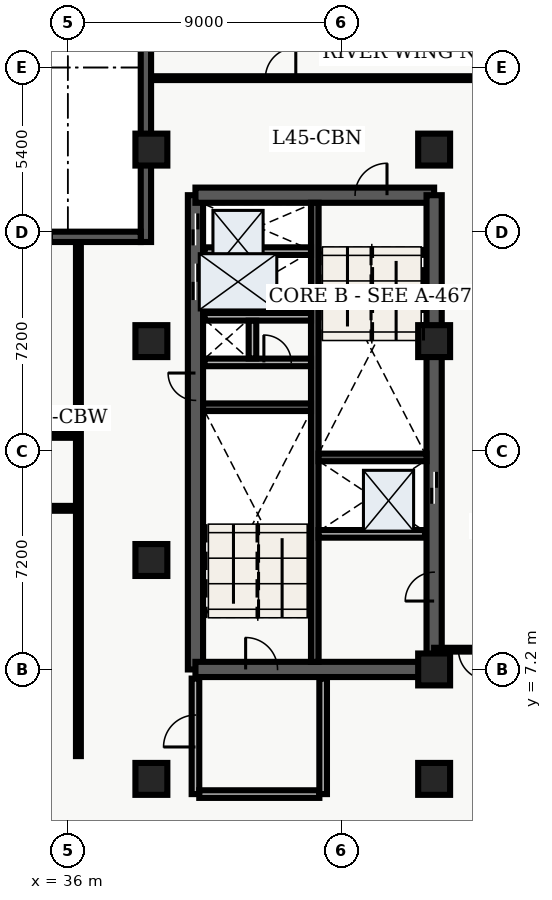
"""IFC4 building model, lengths in metres.
Left out: names, types, materials, properties, quantities, classifications, styles, units other than length and angle.
Written with IfcOpenShell. Run it as: python <this file> out.ifc"""

import sys

from ifc_helpers import new_model, entity, si_unit, converted_unit, direction, frame, origin_with_axes, origin_2d_with_axis, place, context, subcontext, project, spatial, polyline, rectangle, outline, extrude, element, fill, save


model = new_model("IFC4")
c1 = context("Model", 3, precision=1e-05, world=origin_with_axes(), true_north=direction((0.0, 1.0)))
c2 = subcontext(c1, "Body", "Model", "MODEL_VIEW")
j1 = project(units=[si_unit("LENGTHUNIT", "METRE"), converted_unit("PLANEANGLEUNIT", "DEGREE", entity("IfcPlaneAngleMeasure", 0.017), si_unit("PLANEANGLEUNIT", "RADIAN"), dimensions=[0, 0, 0, 0, 0, 0, 0])], contexts=[c1])
p1 = place(None, origin_with_axes())
s1 = spatial("IfcSite", under=j1, at=p1, CompositionType="ELEMENT")
p2 = place(p1, origin_with_axes())
s2 = spatial("IfcBuilding", under=s1, at=p2, CompositionType="ELEMENT")
p3 = place(p2, frame((0.0, 0.0, 183.6), z_axis=(0.0, 0.0, 1.0), x_axis=(1.0, 0.0, 0.0)))
s3 = spatial("IfcBuildingStorey", under=s2, at=p3, CompositionType="ELEMENT", Elevation=183.6)
p4 = place(p3, frame((40.2, 7.2, 0.0), z_axis=(0.0, 0.0, 1.0), x_axis=(0.0, 1.0, 0.0)))
e1 = element("IfcWall", 1, at=p4, inside=s3, PredefinedType="SHEAR", context=c2, shape_type="SweptSolid", body=[
    extrude(outline(polyline([(0.0, -0.25), (15.6, -0.25), (15.6, 0.25), (0.0, 0.25), (0.0, -0.25)])), origin_with_axes(), (0.0, 0.0, 1.0), 3.6),
])
p5 = place(p4, frame((14.475, 0.0, 0.0), z_axis=(0.0, 0.0, 1.0), x_axis=(1.0, 0.0, 0.0)))
e2 = element("IfcOpeningElement", 2, at=p5, cuts=e1, PredefinedType="OPENING", context=c2, shape_type="SweptSolid", body=[
    extrude(rectangle(XDim=1.05, YDim=0.52, at=origin_2d_with_axis()), origin_with_axes(), (0.0, 0.0, 1.0), 2.15),
])
p6 = place(p4, frame((12.75, 0.0, 0.0), z_axis=(0.0, 0.0, 1.0), x_axis=(1.0, 0.0, 0.0)))
e3 = element("IfcOpeningElement", 3, at=p6, cuts=e1, PredefinedType="OPENING", context=c2, shape_type="SweptSolid", body=[
    extrude(rectangle(XDim=1.2, YDim=0.52, at=origin_2d_with_axis()), origin_with_axes(), (0.0, 0.0, 1.0), 2.15),
])
p7 = place(p4, frame((9.3, 0.0, 0.0), z_axis=(0.0, 0.0, 1.0), x_axis=(1.0, 0.0, 0.0)))
e4 = element("IfcOpeningElement", 4, at=p7, cuts=e1, PredefinedType="OPENING", context=c2, shape_type="SweptSolid", body=[
    extrude(rectangle(XDim=0.9, YDim=0.52, at=origin_2d_with_axis()), origin_with_axes(), (0.0, 0.0, 1.0), 2.15),
])
p8 = place(p3, frame((40.2, 7.2, 0.0), z_axis=(0.0, 0.0, 1.0), x_axis=(1.0, 0.0, 0.0)))
e5 = element("IfcWall", 5, at=p8, inside=s3, PredefinedType="SHEAR", context=c2, shape_type="SweptSolid", body=[
    extrude(outline(polyline([(0.0, -0.25), (7.85, -0.25), (7.85, 0.25), (0.0, 0.25), (0.0, -0.25)])), origin_with_axes(), (0.0, 0.0, 1.0), 3.6),
])
p9 = place(p8, frame((2.175, 0.0, 0.0), z_axis=(0.0, 0.0, 1.0), x_axis=(1.0, 0.0, 0.0)))
e6 = element("IfcOpeningElement", 6, at=p9, cuts=e5, PredefinedType="OPENING", context=c2, shape_type="SweptSolid", body=[
    extrude(rectangle(XDim=1.05, YDim=0.52, at=origin_2d_with_axis()), origin_with_axes(), (0.0, 0.0, 1.0), 2.15),
])
p10 = place(p3, frame((40.2, 22.8, 0.0), z_axis=(0.0, 0.0, 1.0), x_axis=(1.0, 0.0, 0.0)))
e7 = element("IfcWall", 7, at=p10, inside=s3, PredefinedType="SHEAR", context=c2, shape_type="SweptSolid", body=[
    extrude(outline(polyline([(0.0, -0.25), (7.85, -0.25), (7.85, 0.25), (0.0, 0.25), (0.0, -0.25)])), origin_with_axes(), (0.0, 0.0, 1.0), 3.6),
])
p11 = place(p10, frame((5.775, 0.0, 0.0), z_axis=(0.0, 0.0, 1.0), x_axis=(1.0, 0.0, 0.0)))
e8 = element("IfcOpeningElement", 8, at=p11, cuts=e7, PredefinedType="OPENING", context=c2, shape_type="SweptSolid", body=[
    extrude(rectangle(XDim=1.05, YDim=0.52, at=origin_2d_with_axis()), origin_with_axes(), (0.0, 0.0, 1.0), 2.15),
])
p12 = place(p3, frame((48.05, 7.2, 0.0), z_axis=(0.0, 0.0, 1.0), x_axis=(0.0, 1.0, 0.0)))
e9 = element("IfcWall", 9, at=p12, inside=s3, PredefinedType="SHEAR", context=c2, shape_type="SweptSolid", body=[
    extrude(outline(polyline([(0.0, -0.25), (15.6, -0.25), (15.6, 0.25), (0.0, 0.25), (0.0, -0.25)])), origin_with_axes(), (0.0, 0.0, 1.0), 3.6),
])
p13 = place(p12, frame((5.975, 0.0, 0.0), z_axis=(0.0, 0.0, 1.0), x_axis=(1.0, 0.0, 0.0)))
e10 = element("IfcOpeningElement", 10, at=p13, cuts=e9, PredefinedType="OPENING", context=c2, shape_type="SweptSolid", body=[
    extrude(rectangle(XDim=1.05, YDim=0.52, at=origin_2d_with_axis()), origin_with_axes(), (0.0, 0.0, 1.0), 2.15),
])
p14 = place(p12, frame((2.725, 0.0, 0.0), z_axis=(0.0, 0.0, 1.0), x_axis=(1.0, 0.0, 0.0)))
e11 = element("IfcOpeningElement", 11, at=p14, cuts=e9, PredefinedType="OPENING", context=c2, shape_type="SweptSolid", body=[
    extrude(rectangle(XDim=0.95, YDim=0.52, at=origin_2d_with_axis()), origin_with_axes(), (0.0, 0.0, 1.0), 2.15),
])
p15 = place(p3, frame((44.125, 7.45, 0.0), z_axis=(0.0, 0.0, 1.0), x_axis=(0.0, 1.0, 0.0)))
e12 = element("IfcWall", 12, at=p15, inside=s3, PredefinedType="SHEAR", context=c2, shape_type="SweptSolid", body=[
    extrude(outline(polyline([(0.0, -0.125), (15.1, -0.125), (15.1, 0.125), (0.0, 0.125), (0.0, -0.125)])), origin_with_axes(), (0.0, 0.0, 1.0), 3.6),
])
for number, where, z_axis, x_axis in (
    (13, (40.45, 15.825, 0.0), (0.0, 0.0, 1.0), (1.0, 0.0, 0.0)),
    (14, (44.25, 14.175, 0.0), (0.0, 0.0, 1.0), (1.0, 0.0, 0.0)),
):
    element("IfcWall", number, at=place(p3, frame(where, z_axis=z_axis, x_axis=x_axis)), inside=s3, PredefinedType="SHEAR", context=c2, shape_type="SweptSolid", body=[
        extrude(outline(polyline([(0.0, -0.125), (3.55, -0.125), (3.55, 0.125), (0.0, 0.125), (0.0, -0.125)])), origin_with_axes(), (0.0, 0.0, 1.0), 3.6),
    ])
p16 = place(p3, frame((40.5, 17.3, 0.0), z_axis=(0.0, 0.0, 1.0), x_axis=(1.0, 0.0, 0.0)))
e15 = element("IfcWall", 15, at=p16, inside=s3, PredefinedType="SOLIDWALL", context=c2, shape_type="SweptSolid", body=[
    extrude(outline(polyline([(0.0, -0.125), (3.5, -0.125), (3.5, 0.125), (0.0, 0.125), (0.0, -0.125)])), origin_with_axes(), (0.0, 0.0, 1.0), 2.64),
])
p17 = place(p16, frame((2.4, 0.0, 0.0), z_axis=(0.0, 0.0, 1.0), x_axis=(1.0, 0.0, 0.0)))
e16 = element("IfcOpeningElement", 16, at=p17, cuts=e15, PredefinedType="OPENING", context=c2, shape_type="SweptSolid", body=[
    extrude(rectangle(XDim=0.9, YDim=0.27, at=origin_2d_with_axis()), origin_with_axes(), (0.0, 0.0, 1.0), 2.15),
])
p18 = place(p3, frame((40.5, 18.8, 0.0), z_axis=(0.0, 0.0, 1.0), x_axis=(1.0, 0.0, 0.0)))
e17 = element("IfcWall", 17, at=p18, inside=s3, PredefinedType="SOLIDWALL", context=c2, shape_type="SweptSolid", body=[
    extrude(outline(polyline([(0.0, -0.125), (3.5, -0.125), (3.5, 0.125), (0.0, 0.125), (0.0, -0.125)])), origin_with_axes(), (0.0, 0.0, 1.0), 2.64),
])
p19 = place(p3, frame((42.075, 17.43, 0.0), z_axis=(0.0, 0.0, 1.0), x_axis=(0.0, 1.0, 0.0)))
e18 = element("IfcWall", 18, at=p19, inside=s3, PredefinedType="SOLIDWALL", context=c2, shape_type="SweptSolid", body=[
    extrude(outline(polyline([(0.0, -0.125), (1.24, -0.125), (1.24, 0.125), (0.0, 0.125), (0.0, -0.125)])), origin_with_axes(), (0.0, 0.0, 1.0), 2.64),
])
p20 = place(p3, frame((40.2, 3.1, 0.0), z_axis=(0.0, 0.0, 1.0), x_axis=(0.0, 1.0, 0.0)))
e19 = element("IfcWall", 19, at=p20, inside=s3, PredefinedType="SOLIDWALL", context=c2, shape_type="SweptSolid", body=[
    extrude(outline(polyline([(0.0, -0.125), (3.8, -0.125), (3.8, 0.125), (0.0, 0.125), (0.0, -0.125)])), origin_with_axes(), (0.0, 0.0, 1.0), 2.64),
])
p21 = place(p20, frame((2.075, 0.0, 0.0), z_axis=(0.0, 0.0, 1.0), x_axis=(1.0, 0.0, 0.0)))
e20 = element("IfcOpeningElement", 20, at=p21, cuts=e19, PredefinedType="OPENING", context=c2, shape_type="SweptSolid", body=[
    extrude(rectangle(XDim=1.05, YDim=0.27, at=origin_2d_with_axis()), origin_with_axes(), (0.0, 0.0, 1.0), 2.15),
])
p22 = place(p3, frame((40.325, 3.1, 0.0), z_axis=(0.0, 0.0, 1.0), x_axis=(1.0, 0.0, 0.0)))
e21 = element("IfcWall", 21, at=p22, inside=s3, PredefinedType="SOLIDWALL", context=c2, shape_type="SweptSolid", body=[
    extrude(outline(polyline([(0.0, -0.125), (3.95, -0.125), (3.95, 0.125), (0.0, 0.125), (0.0, -0.125)])), origin_with_axes(), (0.0, 0.0, 1.0), 2.64),
])
p23 = place(p3, frame((44.4, 3.1, 0.0), z_axis=(0.0, 0.0, 1.0), x_axis=(0.0, 1.0, 0.0)))
e22 = element("IfcWall", 22, at=p23, inside=s3, PredefinedType="SOLIDWALL", context=c2, shape_type="SweptSolid", body=[
    extrude(outline(polyline([(0.0, -0.125), (3.8, -0.125), (3.8, 0.125), (0.0, 0.125), (0.0, -0.125)])), origin_with_axes(), (0.0, 0.0, 1.0), 2.64),
])
for number, where, z_axis, x_axis in (
    (23, (38.75, 3.6, 0.0), (0.0, 0.0, 1.0), (1.0, 0.0, 0.0)),
    (24, (38.75, 10.8, 0.0), (0.0, 0.0, 1.0), (1.0, 0.0, 0.0)),
    (25, (38.75, 18.0, 0.0), (0.0, 0.0, 1.0), (1.0, 0.0, 0.0)),
    (26, (38.75, 24.3, 0.0), (0.0, 0.0, 1.0), (1.0, 0.0, 0.0)),
    (27, (48.05, 3.6, 0.0), (0.0, 0.0, 1.0), (1.0, 0.0, 0.0)),
    (28, (48.05, 7.2, 0.0), (0.0, 0.0, 1.0), (1.0, 0.0, 0.0)),
    (29, (48.05, 18.0, 0.0), (0.0, 0.0, 1.0), (1.0, 0.0, 0.0)),
    (30, (48.05, 24.3, 0.0), (0.0, 0.0, 1.0), (1.0, 0.0, 0.0)),
):
    element("IfcColumn", number, at=place(p3, frame(where, z_axis=z_axis, x_axis=x_axis)), inside=s3, PredefinedType="COLUMN", context=c2, shape_type="SweptSolid", body=[
        extrude(rectangle(XDim=1.05, YDim=1.05, at=origin_2d_with_axis()), origin_with_axes(), (0.0, 0.0, 1.0), 3.9),
    ])
for number, where, z_axis, x_axis in (
    (31, (40.5, 20.96, 0.0), (0.0, 0.0, 1.0), (1.0, 0.0, 0.0)),
    (32, (44.25, 11.66, 0.0), (0.0, 0.0, 1.0), (1.0, 0.0, 0.0)),
):
    element("IfcWall", number, at=place(p3, frame(where, z_axis=z_axis, x_axis=x_axis)), inside=s3, PredefinedType="SOLIDWALL", context=c2, shape_type="SweptSolid", body=[
        extrude(outline(polyline([(0.0, -0.125), (3.5, -0.125), (3.5, 0.125), (0.0, 0.125), (0.0, -0.125)])), origin_with_axes(), (0.0, 0.0, 1.0), 2.64),
    ])
p24 = place(p3, frame((21.15, 12.5, 0.0), z_axis=(0.0, 0.0, 1.0), x_axis=(1.0, 0.0, 0.0)))
e33 = element("IfcWall", 33, at=p24, inside=s3, PredefinedType="PARTITIONING", context=c2, shape_type="SweptSolid", body=[
    extrude(outline(polyline([(0.0, -0.08), (15.2, -0.08), (15.2, 0.08), (0.0, 0.08), (0.0, -0.08)])), origin_with_axes(), (0.0, 0.0, 1.0), 2.64),
])
p25 = place(p24, frame((1.951, 0.0, 0.0), z_axis=(0.0, 0.0, 1.0), x_axis=(1.0, 0.0, 0.0)))
e34 = element("IfcOpeningElement", 34, at=p25, cuts=e33, PredefinedType="OPENING", context=c2, shape_type="SweptSolid", body=[
    extrude(rectangle(XDim=1.0, YDim=0.18, at=origin_2d_with_axis()), origin_with_axes(), (0.0, 0.0, 1.0), 2.15),
])
p26 = place(p24, frame((5.086, 0.0, 0.0), z_axis=(0.0, 0.0, 1.0), x_axis=(1.0, 0.0, 0.0)))
e35 = element("IfcOpeningElement", 35, at=p26, cuts=e33, PredefinedType="OPENING", context=c2, shape_type="SweptSolid", body=[
    extrude(rectangle(XDim=1.0, YDim=0.18, at=origin_2d_with_axis()), origin_with_axes(), (0.0, 0.0, 1.0), 2.15),
])
p27 = place(p24, frame((9.28, 0.0, 0.0), z_axis=(0.0, 0.0, 1.0), x_axis=(1.0, 0.0, 0.0)))
e36 = element("IfcOpeningElement", 36, at=p27, cuts=e33, PredefinedType="OPENING", context=c2, shape_type="SweptSolid", body=[
    extrude(rectangle(XDim=1.2, YDim=0.18, at=origin_2d_with_axis()), origin_with_axes(), (0.0, 0.0, 1.0), 2.2),
])
p28 = place(p24, frame((13.055, 0.0, 0.0), z_axis=(0.0, 0.0, 1.0), x_axis=(1.0, 0.0, 0.0)))
e37 = element("IfcOpeningElement", 37, at=p28, cuts=e33, PredefinedType="OPENING", context=c2, shape_type="SweptSolid", body=[
    extrude(rectangle(XDim=1.0, YDim=0.18, at=origin_2d_with_axis()), origin_with_axes(), (0.0, 0.0, 1.0), 2.15),
])
p29 = place(p3, frame((21.15, 14.9, 0.0), z_axis=(0.0, 0.0, 1.0), x_axis=(1.0, 0.0, 0.0)))
e38 = element("IfcWall", 38, at=p29, inside=s3, PredefinedType="PARTITIONING", context=c2, shape_type="SweptSolid", body=[
    extrude(outline(polyline([(0.0, -0.08), (15.2, -0.08), (15.2, 0.08), (0.0, 0.08), (0.0, -0.08)])), origin_with_axes(), (0.0, 0.0, 1.0), 2.64),
])
p30 = place(p29, frame((7.65, 0.0, 0.0), z_axis=(0.0, 0.0, 1.0), x_axis=(1.0, 0.0, 0.0)))
e39 = element("IfcOpeningElement", 39, at=p30, cuts=e38, PredefinedType="OPENING", context=c2, shape_type="SweptSolid", body=[
    extrude(rectangle(XDim=1.0, YDim=0.18, at=origin_2d_with_axis()), origin_with_axes(), (0.0, 0.0, 1.0), 2.15),
])
p31 = place(p3, frame((36.35, 4.35, 0.0), z_axis=(0.0, 0.0, 1.0), x_axis=(0.0, 1.0, 0.0)))
e40 = element("IfcWall", 40, at=p31, inside=s3, PredefinedType="PARTITIONING", context=c2, shape_type="SweptSolid", body=[
    extrude(outline(polyline([(0.0, -0.08), (16.95, -0.08), (16.95, 0.08), (0.0, 0.08), (0.0, -0.08)])), origin_with_axes(), (0.0, 0.0, 1.0), 2.64),
])
p32 = place(p3, frame((59.665, 7.85, 0.0), z_axis=(0.0, 0.0, 1.0), x_axis=(-1.0, 0.0, 0.0)))
e41 = element("IfcWall", 41, at=p32, inside=s3, PredefinedType="PARTITIONING", context=c2, shape_type="SweptSolid", body=[
    extrude(outline(polyline([(0.0, -0.062), (11.615, -0.062), (11.615, 0.062), (0.0, 0.062), (0.0, -0.062)])), origin_with_axes(), (0.0, 0.0, 1.0), 2.64),
])
p33 = place(p32, frame((10.315, 0.0, 0.0), z_axis=(0.0, 0.0, 1.0), x_axis=(1.0, 0.0, 0.0)))
e42 = element("IfcOpeningElement", 42, at=p33, cuts=e41, PredefinedType="OPENING", context=c2, shape_type="SweptSolid", body=[
    extrude(rectangle(XDim=1.0, YDim=0.145, at=origin_2d_with_axis()), origin_with_axes(), (0.0, 0.0, 1.0), 2.15),
])
p34 = place(p3, frame((38.735, 26.65, 0.0), z_axis=(0.0, 0.0, 1.0), x_axis=(1.0, 0.0, 0.0)))
e43 = element("IfcWall", 43, at=p34, inside=s3, PredefinedType="PARTITIONING", context=c2, shape_type="SweptSolid", body=[
    extrude(outline(polyline([(0.0, -0.062), (20.905, -0.062), (20.905, 0.062), (0.0, 0.062), (0.0, -0.062)])), origin_with_axes(), (0.0, 0.0, 1.0), 2.64),
])
p35 = place(p34, frame((4.265, 0.0, 0.0), z_axis=(0.0, 0.0, 1.0), x_axis=(1.0, 0.0, 0.0)))
e44 = element("IfcOpeningElement", 44, at=p35, cuts=e43, PredefinedType="OPENING", context=c2, shape_type="SweptSolid", body=[
    extrude(rectangle(XDim=1.0, YDim=0.145, at=origin_2d_with_axis()), origin_with_axes(), (0.0, 0.0, 1.0), 2.15),
])
p36 = place(p3, frame((38.57, 21.26, 0.0), z_axis=(0.0, 0.0, 1.0), x_axis=(0.0, 1.0, 0.0)))
e45 = element("IfcWall", 45, at=p36, inside=s3, PredefinedType="SOLIDWALL", context=c2, shape_type="SweptSolid", body=[
    extrude(outline(polyline([(0.0, -0.17), (7.54, -0.17), (7.54, 0.17), (0.0, 0.17), (0.0, -0.17)])), origin_with_axes(), (0.0, 0.0, 1.0), 3.6),
])
p37 = place(p3, frame((26.054, 21.43, 0.0), z_axis=(0.0, 0.0, 1.0), x_axis=(1.0, 0.0, 0.0)))
e46 = element("IfcWall", 46, at=p37, inside=s3, PredefinedType="SOLIDWALL", context=c2, shape_type="SweptSolid", body=[
    extrude(outline(polyline([(0.0, -0.17), (12.346, -0.17), (12.346, 0.17), (0.0, 0.17), (0.0, -0.17)])), origin_with_axes(), (0.0, 0.0, 1.0), 3.6),
])
p38 = place(p37, frame((3.387, 0.0, 0.45), z_axis=(0.0, 0.0, 1.0), x_axis=(1.0, 0.0, 0.0)))
e47 = element("IfcOpeningElement", 47, at=p38, cuts=e46, PredefinedType="OPENING", context=c2, shape_type="SweptSolid", body=[
    extrude(rectangle(XDim=1.8, YDim=0.36, at=origin_2d_with_axis()), origin_with_axes(), (0.0, 0.0, 1.0), 2.1),
])
p39 = place(p37, frame((8.509, 0.0, 0.45), z_axis=(0.0, 0.0, 1.0), x_axis=(1.0, 0.0, 0.0)))
e48 = element("IfcOpeningElement", 48, at=p39, cuts=e46, PredefinedType="OPENING", context=c2, shape_type="SweptSolid", body=[
    extrude(rectangle(XDim=1.8, YDim=0.36, at=origin_2d_with_axis()), origin_with_axes(), (0.0, 0.0, 1.0), 2.1),
])
p40 = place(p12, frame((5.975, 0.0, 0.0), z_axis=(0.0, 0.0, 1.0), x_axis=(1.0, 0.0, 0.0)))
e49 = element("IfcDoor", 49, at=p40, inside=s3, OperationType="SLIDING_TO_LEFT", PredefinedType="DOOR", context=c2, shape_type="SweptSolid", body=[
    extrude(rectangle(XDim=1.05, YDim=0.09, at=origin_2d_with_axis()), origin_with_axes(), (0.0, 0.0, 1.0), 2.15),
])
fill(e10, e49)
p41 = place(p4, frame((14.475, 0.0, 0.0), z_axis=(0.0, 0.0, 1.0), x_axis=(1.0, 0.0, 0.0)))
e50 = element("IfcDoor", 50, at=p41, inside=s3, OperationType="SLIDING_TO_RIGHT", PredefinedType="DOOR", context=c2, shape_type="SweptSolid", body=[
    extrude(rectangle(XDim=1.05, YDim=0.09, at=origin_2d_with_axis()), origin_with_axes(), (0.0, 0.0, 1.0), 2.15),
])
fill(e2, e50)
p42 = place(p4, frame((12.75, 0.0, 0.0), z_axis=(0.0, 0.0, 1.0), x_axis=(1.0, 0.0, 0.0)))
e51 = element("IfcDoor", 51, at=p42, inside=s3, OperationType="DOUBLE_DOOR_SLIDING", PredefinedType="DOOR", context=c2, shape_type="SweptSolid", body=[
    extrude(rectangle(XDim=1.2, YDim=0.09, at=origin_2d_with_axis()), origin_with_axes(), (0.0, 0.0, 1.0), 2.15),
])
fill(e3, e51)
p43 = place(p4, frame((9.3, 0.0, 0.0), z_axis=(0.0, 0.0, 1.0), x_axis=(1.0, 0.0, 0.0)))
e52 = element("IfcDoor", 52, at=p43, inside=s3, OperationType="SINGLE_SWING_RIGHT", PredefinedType="DOOR", context=c2, shape_type="SweptSolid", body=[
    extrude(rectangle(XDim=0.9, YDim=0.09, at=origin_2d_with_axis()), origin_with_axes(), (0.0, 0.0, 1.0), 2.15),
])
fill(e4, e52)
p44 = place(p16, frame((2.4, 0.0, 0.0), z_axis=(0.0, 0.0, 1.0), x_axis=(1.0, 0.0, 0.0)))
e53 = element("IfcDoor", 53, at=p44, inside=s3, OperationType="SINGLE_SWING_LEFT", PredefinedType="DOOR", context=c2, shape_type="SweptSolid", body=[
    extrude(rectangle(XDim=0.9, YDim=0.09, at=origin_2d_with_axis()), origin_with_axes(), (0.0, 0.0, 1.0), 2.15),
])
fill(e16, e53)
p45 = place(p8, frame((2.175, 0.0, 0.0), z_axis=(0.0, 0.0, 1.0), x_axis=(1.0, 0.0, 0.0)))
e54 = element("IfcDoor", 54, at=p45, inside=s3, OperationType="SINGLE_SWING_LEFT", PredefinedType="DOOR", context=c2, shape_type="SweptSolid", body=[
    extrude(rectangle(XDim=1.05, YDim=0.09, at=origin_2d_with_axis()), origin_with_axes(), (0.0, 0.0, 1.0), 2.15),
])
fill(e6, e54)
p46 = place(p10, frame((5.775, 0.0, 0.0), z_axis=(0.0, 0.0, 1.0), x_axis=(1.0, 0.0, 0.0)))
e55 = element("IfcDoor", 55, at=p46, inside=s3, OperationType="SINGLE_SWING_RIGHT", PredefinedType="DOOR", context=c2, shape_type="SweptSolid", body=[
    extrude(rectangle(XDim=1.05, YDim=0.09, at=origin_2d_with_axis()), origin_with_axes(), (0.0, 0.0, 1.0), 2.15),
])
fill(e8, e55)
p47 = place(p20, frame((2.075, 0.0, 0.0), z_axis=(0.0, 0.0, 1.0), x_axis=(1.0, 0.0, 0.0)))
e56 = element("IfcDoor", 56, at=p47, inside=s3, OperationType="SINGLE_SWING_LEFT", PredefinedType="DOOR", context=c2, shape_type="SweptSolid", body=[
    extrude(rectangle(XDim=1.05, YDim=0.09, at=origin_2d_with_axis()), origin_with_axes(), (0.0, 0.0, 1.0), 2.15),
])
fill(e20, e56)
p48 = place(p12, frame((2.725, 0.0, 0.0), z_axis=(0.0, 0.0, 1.0), x_axis=(1.0, 0.0, 0.0)))
e57 = element("IfcDoor", 57, at=p48, inside=s3, OperationType="SINGLE_SWING_LEFT", PredefinedType="DOOR", context=c2, shape_type="SweptSolid", body=[
    extrude(rectangle(XDim=0.95, YDim=0.09, at=origin_2d_with_axis()), origin_with_axes(), (0.0, 0.0, 1.0), 2.15),
])
fill(e11, e57)
p49 = place(p32, frame((10.315, 0.0, 0.0), z_axis=(0.0, 0.0, 1.0), x_axis=(1.0, 0.0, 0.0)))
e58 = element("IfcDoor", 58, at=p49, inside=s3, OperationType="SINGLE_SWING_LEFT", PredefinedType="DOOR", context=c2, shape_type="SweptSolid", body=[
    extrude(rectangle(XDim=1.0, YDim=0.075, at=origin_2d_with_axis()), origin_with_axes(), (0.0, 0.0, 1.0), 2.15),
])
fill(e42, e58)
p50 = place(p34, frame((4.265, 0.0, 0.0), z_axis=(0.0, 0.0, 1.0), x_axis=(1.0, 0.0, 0.0)))
e59 = element("IfcDoor", 59, at=p50, inside=s3, OperationType="SINGLE_SWING_RIGHT", PredefinedType="DOOR", context=c2, shape_type="SweptSolid", body=[
    extrude(rectangle(XDim=1.0, YDim=0.075, at=origin_2d_with_axis()), origin_with_axes(), (0.0, 0.0, 1.0), 2.15),
])
fill(e44, e59)
save(model, sys.argv[1])
